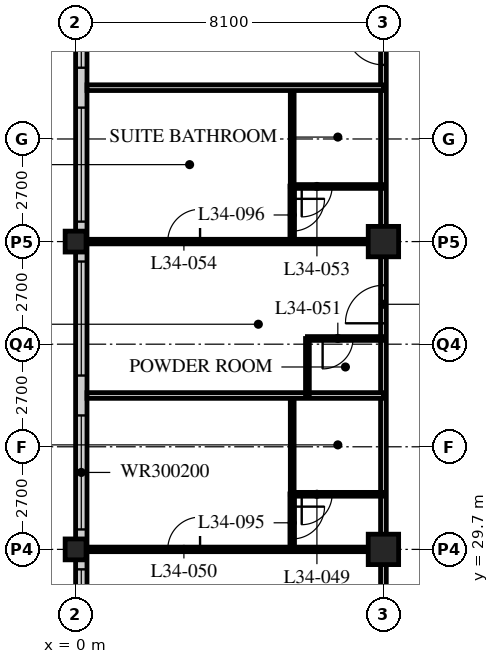
"""IFC4 building model, lengths in metres.
Left out: names, types, materials, properties, quantities, classifications, styles, units other than length and angle.
Written with IfcOpenShell. Run it as: python <this file> out.ifc"""

import sys

from ifc_helpers import new_model, si_unit, direction, frame, frame_2d, origin, origin_2d, place, context, subcontext, project, spatial, rectangle, hollow_rectangle, extrude, element, fill, save


model = new_model("IFC4")
c1 = context("Model", 3, precision=1e-05, world=origin(), true_north=direction((0.0, 1.0)))
c2 = subcontext(c1, "Body", "Model", "MODEL_VIEW")
j1 = project(units=[si_unit("LENGTHUNIT", "METRE"), si_unit("PLANEANGLEUNIT", "RADIAN")], contexts=[c1])
p1 = place(None, origin())
s1 = spatial("IfcSite", under=j1, at=p1, CompositionType="ELEMENT")
p2 = place(p1, origin())
s2 = spatial("IfcBuilding", under=s1, at=p2, CompositionType="ELEMENT")
p3 = place(p2, frame((0.0, 0.0, 134.0)))
s3 = spatial("IfcBuildingStorey", under=s2, at=p3, CompositionType="ELEMENT", Elevation=134.0)
for number, where, z_axis, x_axis in (
    (1, (0.0, 29.7, 0.0), (0.0, 0.0, 1.0), (1.0, 0.0, 0.0)),
    (2, (0.0, 37.8, 0.0), (0.0, 0.0, 1.0), (1.0, 0.0, 0.0)),
):
    element("IfcColumn", number, at=place(p3, frame(where, z_axis=z_axis, x_axis=x_axis)), inside=s3, PredefinedType="COLUMN", context=c2, shape_type="SweptSolid", body=[
        extrude(hollow_rectangle(XDim=0.55, YDim=0.55, WallThickness=0.04, at=origin_2d()), origin(), (0.0, 0.0, 1.0), 3.4),
    ])
for number, where, z_axis, x_axis in (
    (3, (8.1, 29.7, 0.0), (0.0, 0.0, 1.0), (1.0, 0.0, 0.0)),
    (4, (8.1, 37.8, 0.0), (0.0, 0.0, 1.0), (1.0, 0.0, 0.0)),
):
    element("IfcColumn", number, at=place(p3, frame(where, z_axis=z_axis, x_axis=x_axis)), inside=s3, PredefinedType="COLUMN", context=c2, shape_type="SweptSolid", body=[
        extrude(hollow_rectangle(XDim=0.8, YDim=0.8, WallThickness=0.08, at=origin_2d()), origin(), (0.0, 0.0, 1.0), 3.4),
    ])
p4 = place(p3, frame((0.15, 45.6, 0.0), z_axis=(0.0, 0.0, 1.0), x_axis=(0.0, -1.0, 0.0)))
e5 = element("IfcWall", 5, at=p4, inside=s3, PredefinedType="SOLIDWALL", context=c2, shape_type="SweptSolid", body=[
    extrude(rectangle(XDim=32.1, YDim=0.3, at=frame_2d((16.05, 0.0))), origin(), (0.0, 0.0, 1.0), 3.19),
])
p5 = place(p4, frame((0.225, 0.0, 0.9)))
e6 = element("IfcOpeningElement", 6, at=p5, cuts=e5, PredefinedType="OPENING", context=c2, shape_type="SweptSolid", body=[
    extrude(rectangle(XDim=3.0, YDim=2.0, at=frame_2d((1.5, 1.0))), frame((0.0, 0.16, 0.0), z_axis=(0.0, -1.0, 0.0), x_axis=(1.0, 0.0, 0.0)), (0.0, 0.0, 1.0), 0.32),
])
p6 = place(p4, frame((4.275, 0.0, 0.9)))
e7 = element("IfcOpeningElement", 7, at=p6, cuts=e5, PredefinedType="OPENING", context=c2, shape_type="SweptSolid", body=[
    extrude(rectangle(XDim=3.0, YDim=2.0, at=frame_2d((1.5, 1.0))), frame((0.0, 0.16, 0.0), z_axis=(0.0, -1.0, 0.0), x_axis=(1.0, 0.0, 0.0)), (0.0, 0.0, 1.0), 0.32),
])
p7 = place(p4, frame((8.325, 0.0, 0.9)))
e8 = element("IfcOpeningElement", 8, at=p7, cuts=e5, PredefinedType="OPENING", context=c2, shape_type="SweptSolid", body=[
    extrude(rectangle(XDim=3.0, YDim=2.0, at=frame_2d((1.5, 1.0))), frame((0.0, 0.16, 0.0), z_axis=(0.0, -1.0, 0.0), x_axis=(1.0, 0.0, 0.0)), (0.0, 0.0, 1.0), 0.32),
])
p8 = place(p4, frame((12.375, 0.0, 0.9)))
e9 = element("IfcOpeningElement", 9, at=p8, cuts=e5, PredefinedType="OPENING", context=c2, shape_type="SweptSolid", body=[
    extrude(rectangle(XDim=3.0, YDim=2.0, at=frame_2d((1.5, 1.0))), frame((0.0, 0.16, 0.0), z_axis=(0.0, -1.0, 0.0), x_axis=(1.0, 0.0, 0.0)), (0.0, 0.0, 1.0), 0.32),
])
p9 = place(p4, frame((16.425, 0.0, 0.9)))
e10 = element("IfcOpeningElement", 10, at=p9, cuts=e5, PredefinedType="OPENING", context=c2, shape_type="SweptSolid", body=[
    extrude(rectangle(XDim=3.0, YDim=2.0, at=frame_2d((1.5, 1.0))), frame((0.0, 0.16, 0.0), z_axis=(0.0, -1.0, 0.0), x_axis=(1.0, 0.0, 0.0)), (0.0, 0.0, 1.0), 0.32),
])
p10 = place(p4, frame((20.475, 0.0, 0.9)))
e11 = element("IfcOpeningElement", 11, at=p10, cuts=e5, PredefinedType="OPENING", context=c2, shape_type="SweptSolid", body=[
    extrude(rectangle(XDim=3.0, YDim=2.0, at=frame_2d((1.5, 1.0))), frame((0.0, 0.16, 0.0), z_axis=(0.0, -1.0, 0.0), x_axis=(1.0, 0.0, 0.0)), (0.0, 0.0, 1.0), 0.32),
])
p11 = place(p4, frame((24.525, 0.0, 0.9)))
e12 = element("IfcOpeningElement", 12, at=p11, cuts=e5, PredefinedType="OPENING", context=c2, shape_type="SweptSolid", body=[
    extrude(rectangle(XDim=3.0, YDim=2.0, at=frame_2d((1.5, 1.0))), frame((0.0, 0.16, 0.0), z_axis=(0.0, -1.0, 0.0), x_axis=(1.0, 0.0, 0.0)), (0.0, 0.0, 1.0), 0.32),
])
p12 = place(p4, frame((28.575, 0.0, 0.9)))
e13 = element("IfcOpeningElement", 13, at=p12, cuts=e5, PredefinedType="OPENING", context=c2, shape_type="SweptSolid", body=[
    extrude(rectangle(XDim=3.0, YDim=2.0, at=frame_2d((1.5, 1.0))), frame((0.0, 0.16, 0.0), z_axis=(0.0, -1.0, 0.0), x_axis=(1.0, 0.0, 0.0)), (0.0, 0.0, 1.0), 0.32),
])
p13 = place(p3, frame((8.1, 17.55, 0.0), z_axis=(0.0, 0.0, 1.0), x_axis=(0.0, 1.0, 0.0)))
e14 = element("IfcWall", 14, at=p13, inside=s3, PredefinedType="PARTITIONING", context=c2, shape_type="SweptSolid", body=[
    extrude(rectangle(XDim=28.35, YDim=0.15, at=frame_2d((14.175, 0.0))), origin(), (0.0, 0.0, 1.0), 2.578),
])
p14 = place(p13, frame((1.9, 0.0, 0.0)))
e15 = element("IfcOpeningElement", 15, at=p14, cuts=e14, PredefinedType="OPENING", context=c2, shape_type="SweptSolid", body=[
    extrude(rectangle(XDim=1.0, YDim=2.1, at=frame_2d((0.5, 1.05))), frame((0.0, 0.085, 0.0), z_axis=(0.0, -1.0, 0.0), x_axis=(1.0, 0.0, 0.0)), (0.0, 0.0, 1.0), 0.17),
])
p15 = place(p13, frame((10.0, 0.0, 0.0)))
e16 = element("IfcOpeningElement", 16, at=p15, cuts=e14, PredefinedType="OPENING", context=c2, shape_type="SweptSolid", body=[
    extrude(rectangle(XDim=1.0, YDim=2.1, at=frame_2d((0.5, 1.05))), frame((0.0, 0.085, 0.0), z_axis=(0.0, -1.0, 0.0), x_axis=(1.0, 0.0, 0.0)), (0.0, 0.0, 1.0), 0.17),
])
p16 = place(p13, frame((18.1, 0.0, 0.0)))
e17 = element("IfcOpeningElement", 17, at=p16, cuts=e14, PredefinedType="OPENING", context=c2, shape_type="SweptSolid", body=[
    extrude(rectangle(XDim=1.0, YDim=2.1, at=frame_2d((0.5, 1.05))), frame((0.0, 0.085, 0.0), z_axis=(0.0, -1.0, 0.0), x_axis=(1.0, 0.0, 0.0)), (0.0, 0.0, 1.0), 0.17),
])
p17 = place(p13, frame((24.9, 0.0, 0.0)))
e18 = element("IfcOpeningElement", 18, at=p17, cuts=e14, PredefinedType="OPENING", context=c2, shape_type="SweptSolid", body=[
    extrude(rectangle(XDim=1.0, YDim=2.1, at=frame_2d((0.5, 1.05))), frame((0.0, 0.085, 0.0), z_axis=(0.0, -1.0, 0.0), x_axis=(1.0, 0.0, 0.0)), (0.0, 0.0, 1.0), 0.17),
])
p18 = place(p3, frame((5.7, 31.15, 0.0), z_axis=(0.0, 0.0, 1.0), x_axis=(0.0, 1.0, 0.0)))
e19 = element("IfcWall", 19, at=p18, inside=s3, PredefinedType="PARTITIONING", context=c2, shape_type="SweptSolid", body=[
    extrude(rectangle(XDim=2.6, YDim=0.1, at=frame_2d((1.3, 0.0))), origin(), (0.0, 0.0, 1.0), 3.19),
])
p19 = place(p3, frame((8.1, 31.15, 0.0), z_axis=(0.0, 0.0, 1.0), x_axis=(-1.0, 0.0, 0.0)))
e20 = element("IfcWall", 20, at=p19, inside=s3, PredefinedType="PARTITIONING", context=c2, shape_type="SweptSolid", body=[
    extrude(rectangle(XDim=2.4, YDim=0.1, at=frame_2d((1.2, 0.0))), origin(), (0.0, 0.0, 1.0), 3.19),
])
p20 = place(p19, frame((1.35, 0.0, 0.0)))
e21 = element("IfcOpeningElement", 21, at=p20, cuts=e20, PredefinedType="OPENING", context=c2, shape_type="SweptSolid", body=[
    extrude(rectangle(XDim=0.8, YDim=2.1, at=frame_2d((0.4, 1.05))), frame((0.0, 0.06, 0.0), z_axis=(0.0, -1.0, 0.0), x_axis=(1.0, 0.0, 0.0)), (0.0, 0.0, 1.0), 0.12),
])
p21 = place(p3, frame((8.1, 29.7, 0.0), z_axis=(0.0, 0.0, 1.0), x_axis=(-1.0, 0.0, 0.0)))
e22 = element("IfcWall", 22, at=p21, inside=s3, PredefinedType="PARTITIONING", context=c2, shape_type="SweptSolid", body=[
    extrude(rectangle(XDim=7.8, YDim=0.12, at=frame_2d((3.9, 0.0))), origin(), (0.0, 0.0, 1.0), 2.578),
])
p22 = place(p21, frame((4.825, 0.0, 0.0)))
e23 = element("IfcOpeningElement", 23, at=p22, cuts=e22, PredefinedType="OPENING", context=c2, shape_type="SweptSolid", body=[
    extrude(rectangle(XDim=0.85, YDim=2.1, at=frame_2d((0.425, 1.05))), frame((0.0, 0.07, 0.0), z_axis=(0.0, -1.0, 0.0), x_axis=(1.0, 0.0, 0.0)), (0.0, 0.0, 1.0), 0.14),
])
p23 = place(p3, frame((8.1, 33.75, 0.0), z_axis=(0.0, 0.0, 1.0), x_axis=(-1.0, 0.0, 0.0)))
e24 = element("IfcWall", 24, at=p23, inside=s3, PredefinedType="PARTITIONING", context=c2, shape_type="SweptSolid", body=[
    extrude(rectangle(XDim=7.8, YDim=0.15, at=frame_2d((3.9, 0.0))), origin(), (0.0, 0.0, 1.0), 3.19),
])
p24 = place(p3, frame((6.1, 33.75, 0.0), z_axis=(0.0, 0.0, 1.0), x_axis=(0.0, 1.0, 0.0)))
e25 = element("IfcWall", 25, at=p24, inside=s3, PredefinedType="PARTITIONING", context=c2, shape_type="SweptSolid", body=[
    extrude(rectangle(XDim=1.5, YDim=0.1, at=frame_2d((0.75, 0.0))), origin(), (0.0, 0.0, 1.0), 3.19),
])
p25 = place(p3, frame((8.1, 35.25, 0.0), z_axis=(0.0, 0.0, 1.0), x_axis=(-1.0, 0.0, 0.0)))
e26 = element("IfcWall", 26, at=p25, inside=s3, PredefinedType="PARTITIONING", context=c2, shape_type="SweptSolid", body=[
    extrude(rectangle(XDim=2.0, YDim=0.1, at=frame_2d((1.0, 0.0))), origin(), (0.0, 0.0, 1.0), 3.19),
])
p26 = place(p25, frame((0.8, 0.0, 0.0)))
e27 = element("IfcOpeningElement", 27, at=p26, cuts=e26, PredefinedType="OPENING", context=c2, shape_type="SweptSolid", body=[
    extrude(rectangle(XDim=0.8, YDim=2.1, at=frame_2d((0.4, 1.05))), frame((0.0, 0.06, 0.0), z_axis=(0.0, -1.0, 0.0), x_axis=(1.0, 0.0, 0.0)), (0.0, 0.0, 1.0), 0.12),
])
p27 = place(p3, frame((5.7, 39.25, 0.0), z_axis=(0.0, 0.0, 1.0), x_axis=(0.0, 1.0, 0.0)))
e28 = element("IfcWall", 28, at=p27, inside=s3, PredefinedType="PARTITIONING", context=c2, shape_type="SweptSolid", body=[
    extrude(rectangle(XDim=2.6, YDim=0.1, at=frame_2d((1.3, 0.0))), origin(), (0.0, 0.0, 1.0), 3.19),
])
p28 = place(p3, frame((8.1, 39.25, 0.0), z_axis=(0.0, 0.0, 1.0), x_axis=(-1.0, 0.0, 0.0)))
e29 = element("IfcWall", 29, at=p28, inside=s3, PredefinedType="PARTITIONING", context=c2, shape_type="SweptSolid", body=[
    extrude(rectangle(XDim=2.4, YDim=0.1, at=frame_2d((1.2, 0.0))), origin(), (0.0, 0.0, 1.0), 3.19),
])
p29 = place(p28, frame((1.35, 0.0, 0.0)))
e30 = element("IfcOpeningElement", 30, at=p29, cuts=e29, PredefinedType="OPENING", context=c2, shape_type="SweptSolid", body=[
    extrude(rectangle(XDim=0.8, YDim=2.1, at=frame_2d((0.4, 1.05))), frame((0.0, 0.06, 0.0), z_axis=(0.0, -1.0, 0.0), x_axis=(1.0, 0.0, 0.0)), (0.0, 0.0, 1.0), 0.12),
])
p30 = place(p3, frame((8.1, 37.8, 0.0), z_axis=(0.0, 0.0, 1.0), x_axis=(-1.0, 0.0, 0.0)))
e31 = element("IfcWall", 31, at=p30, inside=s3, PredefinedType="PARTITIONING", context=c2, shape_type="SweptSolid", body=[
    extrude(rectangle(XDim=7.8, YDim=0.12, at=frame_2d((3.9, 0.0))), origin(), (0.0, 0.0, 1.0), 2.578),
])
p31 = place(p30, frame((4.825, 0.0, 0.0)))
e32 = element("IfcOpeningElement", 32, at=p31, cuts=e31, PredefinedType="OPENING", context=c2, shape_type="SweptSolid", body=[
    extrude(rectangle(XDim=0.85, YDim=2.1, at=frame_2d((0.425, 1.05))), frame((0.0, 0.07, 0.0), z_axis=(0.0, -1.0, 0.0), x_axis=(1.0, 0.0, 0.0)), (0.0, 0.0, 1.0), 0.14),
])
p32 = place(p3, frame((8.1, 41.85, 0.0), z_axis=(0.0, 0.0, 1.0), x_axis=(-1.0, 0.0, 0.0)))
e33 = element("IfcWall", 33, at=p32, inside=s3, PredefinedType="PARTITIONING", context=c2, shape_type="SweptSolid", body=[
    extrude(rectangle(XDim=7.8, YDim=0.15, at=frame_2d((3.9, 0.0))), origin(), (0.0, 0.0, 1.0), 3.19),
])
p33 = place(p3, frame((5.7, 29.7, 0.0), z_axis=(0.0, 0.0, 1.0), x_axis=(0.0, 1.0, 0.0)))
e34 = element("IfcWall", 34, at=p33, inside=s3, PredefinedType="PARTITIONING", context=c2, shape_type="SweptSolid", body=[
    extrude(rectangle(XDim=1.46, YDim=0.12, at=frame_2d((0.73, 0.0))), origin(), (0.0, 0.0, 1.0), 3.19),
])
p34 = place(p33, frame((0.275, 0.0, 0.0)))
e35 = element("IfcOpeningElement", 35, at=p34, cuts=e34, PredefinedType="OPENING", context=c2, shape_type="SweptSolid", body=[
    extrude(rectangle(XDim=0.85, YDim=2.1, at=frame_2d((0.425, 1.05))), frame((0.0, 0.07, 0.0), z_axis=(0.0, -1.0, 0.0), x_axis=(1.0, 0.0, 0.0)), (0.0, 0.0, 1.0), 0.14),
])
p35 = place(p3, frame((5.7, 37.8, 0.0), z_axis=(0.0, 0.0, 1.0), x_axis=(0.0, 1.0, 0.0)))
e36 = element("IfcWall", 36, at=p35, inside=s3, PredefinedType="PARTITIONING", context=c2, shape_type="SweptSolid", body=[
    extrude(rectangle(XDim=1.46, YDim=0.12, at=frame_2d((0.73, 0.0))), origin(), (0.0, 0.0, 1.0), 3.19),
])
p36 = place(p35, frame((0.275, 0.0, 0.0)))
e37 = element("IfcOpeningElement", 37, at=p36, cuts=e36, PredefinedType="OPENING", context=c2, shape_type="SweptSolid", body=[
    extrude(rectangle(XDim=0.85, YDim=2.1, at=frame_2d((0.425, 1.05))), frame((0.0, 0.07, 0.0), z_axis=(0.0, -1.0, 0.0), x_axis=(1.0, 0.0, 0.0)), (0.0, 0.0, 1.0), 0.14),
])
p37 = place(p5, origin())
e38 = element("IfcWindow", 38, at=p37, inside=s3, PartitioningType="SINGLE_PANEL", PredefinedType="WINDOW", context=c2, shape_type="SweptSolid", body=[
    extrude(rectangle(XDim=3.0, YDim=2.0, at=frame_2d((1.5, 1.0))), frame((0.0, 0.03, 0.0), z_axis=(0.0, -1.0, 0.0), x_axis=(1.0, 0.0, 0.0)), (0.0, 0.0, 1.0), 0.06),
])
fill(e6, e38)
p38 = place(p6, origin())
e39 = element("IfcWindow", 39, at=p38, inside=s3, PartitioningType="SINGLE_PANEL", PredefinedType="WINDOW", context=c2, shape_type="SweptSolid", body=[
    extrude(rectangle(XDim=3.0, YDim=2.0, at=frame_2d((1.5, 1.0))), frame((0.0, 0.03, 0.0), z_axis=(0.0, -1.0, 0.0), x_axis=(1.0, 0.0, 0.0)), (0.0, 0.0, 1.0), 0.06),
])
fill(e7, e39)
p39 = place(p7, origin())
e40 = element("IfcWindow", 40, at=p39, inside=s3, PartitioningType="SINGLE_PANEL", PredefinedType="WINDOW", context=c2, shape_type="SweptSolid", body=[
    extrude(rectangle(XDim=3.0, YDim=2.0, at=frame_2d((1.5, 1.0))), frame((0.0, 0.03, 0.0), z_axis=(0.0, -1.0, 0.0), x_axis=(1.0, 0.0, 0.0)), (0.0, 0.0, 1.0), 0.06),
])
fill(e8, e40)
p40 = place(p8, origin())
e41 = element("IfcWindow", 41, at=p40, inside=s3, PartitioningType="SINGLE_PANEL", PredefinedType="WINDOW", context=c2, shape_type="SweptSolid", body=[
    extrude(rectangle(XDim=3.0, YDim=2.0, at=frame_2d((1.5, 1.0))), frame((0.0, 0.03, 0.0), z_axis=(0.0, -1.0, 0.0), x_axis=(1.0, 0.0, 0.0)), (0.0, 0.0, 1.0), 0.06),
])
fill(e9, e41)
p41 = place(p9, origin())
e42 = element("IfcWindow", 42, at=p41, inside=s3, PartitioningType="SINGLE_PANEL", PredefinedType="WINDOW", context=c2, shape_type="SweptSolid", body=[
    extrude(rectangle(XDim=3.0, YDim=2.0, at=frame_2d((1.5, 1.0))), frame((0.0, 0.03, 0.0), z_axis=(0.0, -1.0, 0.0), x_axis=(1.0, 0.0, 0.0)), (0.0, 0.0, 1.0), 0.06),
])
fill(e10, e42)
p42 = place(p20, origin())
e43 = element("IfcDoor", 43, at=p42, inside=s3, OperationType="SINGLE_SWING_RIGHT", PredefinedType="DOOR", context=c2, shape_type="SweptSolid", body=[
    extrude(rectangle(XDim=0.8, YDim=2.1, at=frame_2d((0.4, 1.05))), frame((0.0, 0.025, 0.0), z_axis=(0.0, -1.0, 0.0), x_axis=(1.0, 0.0, 0.0)), (0.0, 0.0, 1.0), 0.05),
])
fill(e21, e43)
p43 = place(p22, origin())
e44 = element("IfcDoor", 44, at=p43, inside=s3, OperationType="SINGLE_SWING_RIGHT", PredefinedType="DOOR", context=c2, shape_type="SweptSolid", body=[
    extrude(rectangle(XDim=0.85, YDim=2.1, at=frame_2d((0.425, 1.05))), frame((0.0, 0.025, 0.0), z_axis=(0.0, -1.0, 0.0), x_axis=(1.0, 0.0, 0.0)), (0.0, 0.0, 1.0), 0.05),
])
fill(e23, e44)
p44 = place(p26, origin())
e45 = element("IfcDoor", 45, at=p44, inside=s3, OperationType="SINGLE_SWING_RIGHT", PredefinedType="DOOR", context=c2, shape_type="SweptSolid", body=[
    extrude(rectangle(XDim=0.8, YDim=2.1, at=frame_2d((0.4, 1.05))), frame((0.0, 0.025, 0.0), z_axis=(0.0, -1.0, 0.0), x_axis=(1.0, 0.0, 0.0)), (0.0, 0.0, 1.0), 0.05),
])
fill(e27, e45)
p45 = place(p16, origin())
e46 = element("IfcDoor", 46, at=p45, inside=s3, OperationType="SINGLE_SWING_LEFT", PredefinedType="DOOR", context=c2, shape_type="SweptSolid", body=[
    extrude(rectangle(XDim=1.0, YDim=2.1, at=frame_2d((0.5, 1.05))), frame((0.0, 0.025, 0.0), z_axis=(0.0, -1.0, 0.0), x_axis=(1.0, 0.0, 0.0)), (0.0, 0.0, 1.0), 0.05),
])
fill(e17, e46)
p46 = place(p29, origin())
e47 = element("IfcDoor", 47, at=p46, inside=s3, OperationType="SINGLE_SWING_RIGHT", PredefinedType="DOOR", context=c2, shape_type="SweptSolid", body=[
    extrude(rectangle(XDim=0.8, YDim=2.1, at=frame_2d((0.4, 1.05))), frame((0.0, 0.025, 0.0), z_axis=(0.0, -1.0, 0.0), x_axis=(1.0, 0.0, 0.0)), (0.0, 0.0, 1.0), 0.05),
])
fill(e30, e47)
p47 = place(p31, origin())
e48 = element("IfcDoor", 48, at=p47, inside=s3, OperationType="SINGLE_SWING_RIGHT", PredefinedType="DOOR", context=c2, shape_type="SweptSolid", body=[
    extrude(rectangle(XDim=0.85, YDim=2.1, at=frame_2d((0.425, 1.05))), frame((0.0, 0.025, 0.0), z_axis=(0.0, -1.0, 0.0), x_axis=(1.0, 0.0, 0.0)), (0.0, 0.0, 1.0), 0.05),
])
fill(e32, e48)
p48 = place(p17, origin())
e49 = element("IfcDoor", 49, at=p48, inside=s3, OperationType="SINGLE_SWING_RIGHT", PredefinedType="DOOR", context=c2, shape_type="SweptSolid", body=[
    extrude(rectangle(XDim=1.0, YDim=2.1, at=frame_2d((0.5, 1.05))), frame((0.0, 0.025, 0.0), z_axis=(0.0, -1.0, 0.0), x_axis=(1.0, 0.0, 0.0)), (0.0, 0.0, 1.0), 0.05),
])
fill(e18, e49)
p49 = place(p34, origin())
e50 = element("IfcDoor", 50, at=p49, inside=s3, OperationType="SINGLE_SWING_LEFT", PredefinedType="DOOR", context=c2, shape_type="SweptSolid", body=[
    extrude(rectangle(XDim=0.85, YDim=2.1, at=frame_2d((0.425, 1.05))), frame((0.0, 0.025, 0.0), z_axis=(0.0, -1.0, 0.0), x_axis=(1.0, 0.0, 0.0)), (0.0, 0.0, 1.0), 0.05),
])
fill(e35, e50)
p50 = place(p36, origin())
e51 = element("IfcDoor", 51, at=p50, inside=s3, OperationType="SINGLE_SWING_LEFT", PredefinedType="DOOR", context=c2, shape_type="SweptSolid", body=[
    extrude(rectangle(XDim=0.85, YDim=2.1, at=frame_2d((0.425, 1.05))), frame((0.0, 0.025, 0.0), z_axis=(0.0, -1.0, 0.0), x_axis=(1.0, 0.0, 0.0)), (0.0, 0.0, 1.0), 0.05),
])
fill(e37, e51)
save(model, sys.argv[1])
